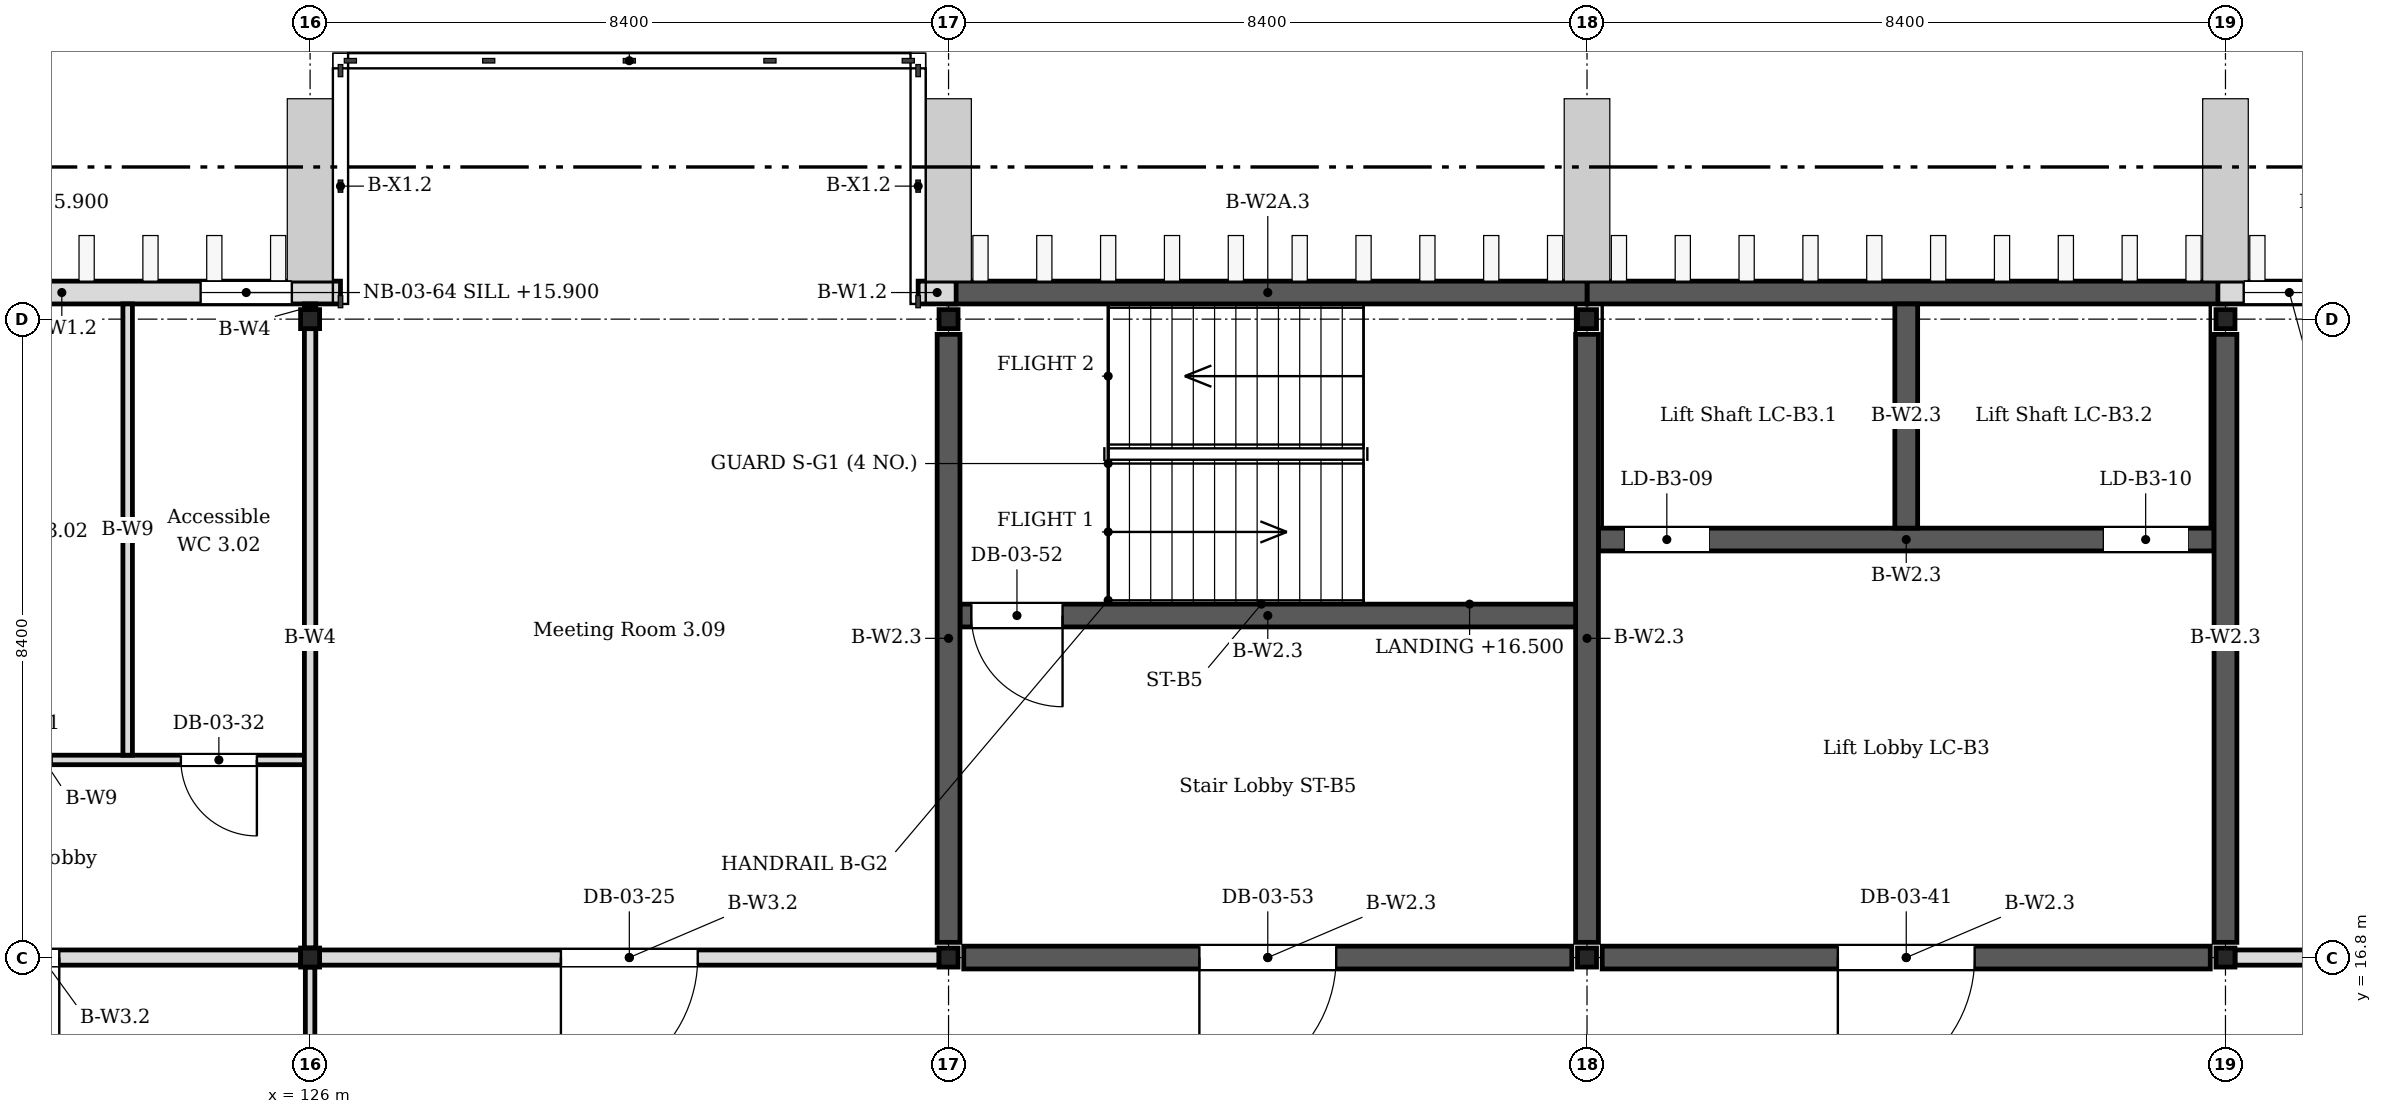
"""IFC4 building model, lengths in metres.
Left out: names, types, materials, properties, quantities, classifications, styles, units other than length and angle.
Written with IfcOpenShell. Run it as: python <this file> out.ifc"""

import sys

from ifc_helpers import new_model, si_unit, direction, frame, frame_2d, origin, origin_2d, place, context, subcontext, project, spatial, rectangle, i_section, extrude, element, fill, save


model = new_model("IFC4")
c1 = context("Model", 3, precision=1e-05, world=origin(), true_north=direction((0.0, 1.0)))
c2 = subcontext(c1, "Body", "Model", "MODEL_VIEW")
j1 = project(units=[si_unit("LENGTHUNIT", "METRE"), si_unit("PLANEANGLEUNIT", "RADIAN")], contexts=[c1])
p1 = place(None, origin())
s1 = spatial("IfcSite", under=j1, at=p1, CompositionType="ELEMENT")
p2 = place(p1, origin())
s2 = spatial("IfcBuilding", under=s1, at=p2, CompositionType="ELEMENT")
p3 = place(p2, frame((0.0, 0.0, 14.4)))
s3 = spatial("IfcBuildingStorey", under=s2, at=p3, CompositionType="ELEMENT", Elevation=14.4)
for number, where, z_axis, x_axis in (
    (1, (126.0, 16.8, 0.0), (0.0, 0.0, 1.0), (1.0, 0.0, 0.0)),
    (2, (126.0, 25.2, 0.0), (0.0, 0.0, 1.0), (1.0, 0.0, 0.0)),
    (3, (134.4, 16.8, 0.0), (0.0, 0.0, 1.0), (1.0, 0.0, 0.0)),
    (4, (134.4, 25.2, 0.0), (0.0, 0.0, 1.0), (1.0, 0.0, 0.0)),
    (5, (142.8, 16.8, 0.0), (0.0, 0.0, 1.0), (1.0, 0.0, 0.0)),
    (6, (142.8, 25.2, 0.0), (0.0, 0.0, 1.0), (1.0, 0.0, 0.0)),
    (7, (151.2, 16.8, 0.0), (0.0, 0.0, 1.0), (1.0, 0.0, 0.0)),
    (8, (151.2, 25.2, 0.0), (0.0, 0.0, 1.0), (1.0, 0.0, 0.0)),
):
    element("IfcColumn", number, at=place(p3, frame(where, z_axis=z_axis, x_axis=x_axis)), inside=s3, PredefinedType="COLUMN", context=c2, shape_type="SweptSolid", body=[
        extrude(i_section(OverallWidth=0.25, OverallDepth=0.25, WebThickness=0.009, FlangeThickness=0.014, FilletRadius=0.013, at=origin_2d()), origin(), (0.0, 0.0, 1.0), 3.95),
    ])
for number, where, z_axis, x_axis in (
    (9, (142.8, 17.0, 0.0), (0.0, 0.0, 1.0), (0.0, 1.0, 0.0)),
    (10, (151.2, 17.0, 0.0), (0.0, 0.0, 1.0), (0.0, 1.0, 0.0)),
):
    element("IfcWall", number, at=place(p3, frame(where, z_axis=z_axis, x_axis=x_axis)), inside=s3, PredefinedType="SHEAR", context=c2, shape_type="SweptSolid", body=[
        extrude(rectangle(XDim=8.0, YDim=0.3, at=frame_2d((4.0, 0.0))), origin(), (0.0, 0.0, 1.0), 3.95),
    ])
p4 = place(p3, frame((143.0, 16.8, 0.0), z_axis=(0.0, 0.0, 1.0), x_axis=(1.0, 0.0, 0.0)))
e11 = element("IfcWall", 11, at=p4, inside=s3, PredefinedType="SHEAR", context=c2, shape_type="SweptSolid", body=[
    extrude(rectangle(XDim=8.0, YDim=0.3, at=frame_2d((4.0, 0.0))), origin(), (0.0, 0.0, 1.0), 3.95),
])
p5 = place(p4, frame((3.1, 0.0, 0.0)))
e12 = element("IfcOpeningElement", 12, at=p5, cuts=e11, PredefinedType="OPENING", context=c2, shape_type="SweptSolid", body=[
    extrude(rectangle(XDim=1.8, YDim=2.1, at=frame_2d((0.9, 1.05))), frame((0.0, 0.16, 0.0), z_axis=(0.0, -1.0, 0.0), x_axis=(1.0, 0.0, 0.0)), (0.0, 0.0, 1.0), 0.32),
])
p6 = place(p3, frame((142.95, 22.3, 0.0), z_axis=(0.0, 0.0, 1.0), x_axis=(1.0, 0.0, 0.0)))
e13 = element("IfcWall", 13, at=p6, inside=s3, PredefinedType="SHEAR", context=c2, shape_type="SweptSolid", body=[
    extrude(rectangle(XDim=8.1, YDim=0.3, at=frame_2d((4.05, 0.0))), origin(), (0.0, 0.0, 1.0), 3.95),
])
p7 = place(p6, frame((0.35, 0.0, 0.0)))
e14 = element("IfcOpeningElement", 14, at=p7, cuts=e13, PredefinedType="OPENING", context=c2, shape_type="SweptSolid", body=[
    extrude(rectangle(XDim=1.1, YDim=2.2, at=frame_2d((0.55, 1.1))), frame((0.0, 0.16, 0.0), z_axis=(0.0, -1.0, 0.0), x_axis=(1.0, 0.0, 0.0)), (0.0, 0.0, 1.0), 0.32),
])
p8 = place(p6, frame((6.65, 0.0, 0.0)))
e15 = element("IfcOpeningElement", 15, at=p8, cuts=e13, PredefinedType="OPENING", context=c2, shape_type="SweptSolid", body=[
    extrude(rectangle(XDim=1.1, YDim=2.2, at=frame_2d((0.55, 1.1))), frame((0.0, 0.16, 0.0), z_axis=(0.0, -1.0, 0.0), x_axis=(1.0, 0.0, 0.0)), (0.0, 0.0, 1.0), 0.32),
])
p9 = place(p3, frame((142.8, 25.55, 0.0), z_axis=(0.0, 0.0, 1.0), x_axis=(1.0, 0.0, 0.0)))
e16 = element("IfcWall", 16, at=p9, inside=s3, PredefinedType="SHEAR", context=c2, shape_type="SweptSolid", body=[
    extrude(rectangle(XDim=8.4, YDim=0.3, at=frame_2d((4.2, 0.0))), origin(), (0.0, 0.0, 1.0), 3.95),
])
p10 = place(p3, frame((147.0, 22.45, 0.0), z_axis=(0.0, 0.0, 1.0), x_axis=(0.0, 1.0, 0.0)))
e17 = element("IfcWall", 17, at=p10, inside=s3, PredefinedType="SHEAR", context=c2, shape_type="SweptSolid", body=[
    extrude(rectangle(XDim=2.95, YDim=0.3, at=frame_2d((1.475, 0.0))), origin(), (0.0, 0.0, 1.0), 3.95),
])
p11 = place(p3, frame((134.4, 17.0, 0.0), z_axis=(0.0, 0.0, 1.0), x_axis=(0.0, 1.0, 0.0)))
e18 = element("IfcWall", 18, at=p11, inside=s3, PredefinedType="SHEAR", context=c2, shape_type="SweptSolid", body=[
    extrude(rectangle(XDim=8.0, YDim=0.3, at=frame_2d((4.0, 0.0))), origin(), (0.0, 0.0, 1.0), 3.95),
])
p12 = place(p3, frame((134.6, 16.8, 0.0), z_axis=(0.0, 0.0, 1.0), x_axis=(1.0, 0.0, 0.0)))
e19 = element("IfcWall", 19, at=p12, inside=s3, PredefinedType="SHEAR", context=c2, shape_type="SweptSolid", body=[
    extrude(rectangle(XDim=8.0, YDim=0.3, at=frame_2d((4.0, 0.0))), origin(), (0.0, 0.0, 1.0), 3.95),
])
p13 = place(p12, frame((3.1, 0.0, 0.0)))
e20 = element("IfcOpeningElement", 20, at=p13, cuts=e19, PredefinedType="OPENING", context=c2, shape_type="SweptSolid", body=[
    extrude(rectangle(XDim=1.8, YDim=2.1, at=frame_2d((0.9, 1.05))), frame((0.0, 0.16, 0.0), z_axis=(0.0, -1.0, 0.0), x_axis=(1.0, 0.0, 0.0)), (0.0, 0.0, 1.0), 0.32),
])
p14 = place(p3, frame((134.55, 21.3, 0.0), z_axis=(0.0, 0.0, 1.0), x_axis=(1.0, 0.0, 0.0)))
e21 = element("IfcWall", 21, at=p14, inside=s3, PredefinedType="SHEAR", context=c2, shape_type="SweptSolid", body=[
    extrude(rectangle(XDim=8.1, YDim=0.3, at=frame_2d((4.05, 0.0))), origin(), (0.0, 0.0, 1.0), 3.95),
])
p15 = place(p14, frame((0.15, 0.0, 0.0)))
e22 = element("IfcOpeningElement", 22, at=p15, cuts=e21, PredefinedType="OPENING", context=c2, shape_type="SweptSolid", body=[
    extrude(rectangle(XDim=1.2, YDim=2.1, at=frame_2d((0.6, 1.05))), frame((0.0, 0.16, 0.0), z_axis=(0.0, -1.0, 0.0), x_axis=(1.0, 0.0, 0.0)), (0.0, 0.0, 1.0), 0.32),
])
p16 = place(p3, frame((134.4, 25.55, 0.0), z_axis=(0.0, 0.0, 1.0), x_axis=(1.0, 0.0, 0.0)))
e23 = element("IfcWall", 23, at=p16, inside=s3, PredefinedType="SHEAR", context=c2, shape_type="SweptSolid", body=[
    extrude(rectangle(XDim=8.4, YDim=0.3, at=frame_2d((4.2, 0.0))), origin(), (0.0, 0.0, 1.0), 3.95),
])
p17 = place(p3, frame((117.5, 25.55, 0.0), z_axis=(0.0, 0.0, 1.0), x_axis=(1.0, 0.0, 0.0)))
e24 = element("IfcWall", 24, at=p17, inside=s3, PredefinedType="SOLIDWALL", context=c2, shape_type="SweptSolid", body=[
    extrude(rectangle(XDim=8.9, YDim=0.3, at=frame_2d((4.45, 0.0))), origin(), (0.0, 0.0, 1.0), 3.95),
])
p18 = place(p17, frame((0.34, 0.0, 1.5)))
e25 = element("IfcOpeningElement", 25, at=p18, cuts=e24, PredefinedType="OPENING", context=c2, shape_type="SweptSolid", body=[
    extrude(rectangle(XDim=1.2, YDim=1.2, at=frame_2d((0.6, 0.6))), frame((0.0, 0.16, 0.0), z_axis=(0.0, -1.0, 0.0), x_axis=(1.0, 0.0, 0.0)), (0.0, 0.0, 1.0), 0.32),
])
p19 = place(p17, frame((3.7, 0.0, 1.5)))
e26 = element("IfcOpeningElement", 26, at=p19, cuts=e24, PredefinedType="OPENING", context=c2, shape_type="SweptSolid", body=[
    extrude(rectangle(XDim=1.2, YDim=1.2, at=frame_2d((0.6, 0.6))), frame((0.0, 0.16, 0.0), z_axis=(0.0, -1.0, 0.0), x_axis=(1.0, 0.0, 0.0)), (0.0, 0.0, 1.0), 0.32),
])
p20 = place(p17, frame((7.06, 0.0, 1.5)))
e27 = element("IfcOpeningElement", 27, at=p20, cuts=e24, PredefinedType="OPENING", context=c2, shape_type="SweptSolid", body=[
    extrude(rectangle(XDim=1.2, YDim=1.2, at=frame_2d((0.6, 0.6))), frame((0.0, 0.16, 0.0), z_axis=(0.0, -1.0, 0.0), x_axis=(1.0, 0.0, 0.0)), (0.0, 0.0, 1.0), 0.32),
])
p21 = place(p3, frame((134.0, 25.55, 0.0), z_axis=(0.0, 0.0, 1.0), x_axis=(1.0, 0.0, 0.0)))
e28 = element("IfcWall", 28, at=p21, inside=s3, PredefinedType="SOLIDWALL", context=c2, shape_type="SweptSolid", body=[
    extrude(rectangle(XDim=0.5, YDim=0.3, at=frame_2d((0.25, 0.0))), origin(), (0.0, 0.0, 1.0), 3.95),
])
p22 = place(p3, frame((151.1, 25.55, 0.0), z_axis=(0.0, 0.0, 1.0), x_axis=(1.0, 0.0, 0.0)))
e29 = element("IfcWall", 29, at=p22, inside=s3, PredefinedType="SOLIDWALL", context=c2, shape_type="SweptSolid", body=[
    extrude(rectangle(XDim=5.9, YDim=0.3, at=frame_2d((2.95, 0.0))), origin(), (0.0, 0.0, 1.0), 3.95),
])
p23 = place(p22, frame((0.34, 0.0, 1.5)))
e30 = element("IfcOpeningElement", 30, at=p23, cuts=e29, PredefinedType="OPENING", context=c2, shape_type="SweptSolid", body=[
    extrude(rectangle(XDim=1.2, YDim=1.2, at=frame_2d((0.6, 0.6))), frame((0.0, 0.16, 0.0), z_axis=(0.0, -1.0, 0.0), x_axis=(1.0, 0.0, 0.0)), (0.0, 0.0, 1.0), 0.32),
])
p24 = place(p22, frame((2.02, 0.0, 1.5)))
e31 = element("IfcOpeningElement", 31, at=p24, cuts=e29, PredefinedType="OPENING", context=c2, shape_type="SweptSolid", body=[
    extrude(rectangle(XDim=1.2, YDim=1.2, at=frame_2d((0.6, 0.6))), frame((0.0, 0.16, 0.0), z_axis=(0.0, -1.0, 0.0), x_axis=(1.0, 0.0, 0.0)), (0.0, 0.0, 1.0), 0.32),
])
p25 = place(p22, frame((3.7, 0.0, 1.5)))
e32 = element("IfcOpeningElement", 32, at=p25, cuts=e29, PredefinedType="OPENING", context=c2, shape_type="SweptSolid", body=[
    extrude(rectangle(XDim=1.2, YDim=1.2, at=frame_2d((0.6, 0.6))), frame((0.0, 0.16, 0.0), z_axis=(0.0, -1.0, 0.0), x_axis=(1.0, 0.0, 0.0)), (0.0, 0.0, 1.0), 0.32),
])
p26 = place(p3, frame((117.725, 16.8, 0.0), z_axis=(0.0, 0.0, 1.0), x_axis=(1.0, 0.0, 0.0)))
e33 = element("IfcWall", 33, at=p26, inside=s3, PredefinedType="PARTITIONING", context=c2, shape_type="SweptSolid", body=[
    extrude(rectangle(XDim=8.15, YDim=0.2, at=frame_2d((4.075, 0.0))), origin(), (0.0, 0.0, 1.0), 3.25),
])
p27 = place(p26, frame((3.175, 0.0, 0.0)))
e34 = element("IfcOpeningElement", 34, at=p27, cuts=e33, PredefinedType="OPENING", context=c2, shape_type="SweptSolid", body=[
    extrude(rectangle(XDim=1.8, YDim=2.1, at=frame_2d((0.9, 1.05))), frame((0.0, 0.11, 0.0), z_axis=(0.0, -1.0, 0.0), x_axis=(1.0, 0.0, 0.0)), (0.0, 0.0, 1.0), 0.22),
])
p28 = place(p3, frame((126.125, 16.8, 0.0), z_axis=(0.0, 0.0, 1.0), x_axis=(1.0, 0.0, 0.0)))
e35 = element("IfcWall", 35, at=p28, inside=s3, PredefinedType="PARTITIONING", context=c2, shape_type="SweptSolid", body=[
    extrude(rectangle(XDim=8.15, YDim=0.2, at=frame_2d((4.075, 0.0))), origin(), (0.0, 0.0, 1.0), 3.25),
])
p29 = place(p28, frame((3.175, 0.0, 0.0)))
e36 = element("IfcOpeningElement", 36, at=p29, cuts=e35, PredefinedType="OPENING", context=c2, shape_type="SweptSolid", body=[
    extrude(rectangle(XDim=1.8, YDim=2.1, at=frame_2d((0.9, 1.05))), frame((0.0, 0.11, 0.0), z_axis=(0.0, -1.0, 0.0), x_axis=(1.0, 0.0, 0.0)), (0.0, 0.0, 1.0), 0.22),
])
p30 = place(p3, frame((151.325, 16.8, 0.0), z_axis=(0.0, 0.0, 1.0), x_axis=(1.0, 0.0, 0.0)))
e37 = element("IfcWall", 37, at=p30, inside=s3, PredefinedType="PARTITIONING", context=c2, shape_type="SweptSolid", body=[
    extrude(rectangle(XDim=5.875, YDim=0.2, at=frame_2d((2.938, 0.0))), origin(), (0.0, 0.0, 1.0), 3.25),
])
p31 = place(p30, frame((3.575, 0.0, 0.0)))
e38 = element("IfcOpeningElement", 38, at=p31, cuts=e37, PredefinedType="OPENING", context=c2, shape_type="SweptSolid", body=[
    extrude(rectangle(XDim=1.0, YDim=2.1, at=frame_2d((0.5, 1.05))), frame((0.0, 0.11, 0.0), z_axis=(0.0, -1.0, 0.0), x_axis=(1.0, 0.0, 0.0)), (0.0, 0.0, 1.0), 0.22),
])
p32 = place(p3, frame((117.75, 19.4, 0.0), z_axis=(0.0, 0.0, 1.0), x_axis=(1.0, 0.0, 0.0)))
e39 = element("IfcWall", 39, at=p32, inside=s3, PredefinedType="PARTITIONING", context=c2, shape_type="SweptSolid", body=[
    extrude(rectangle(XDim=8.175, YDim=0.125, at=frame_2d((4.087, 0.0))), origin(), (0.0, 0.0, 1.0), 3.25),
])
p33 = place(p32, frame((0.85, 0.0, 0.0)))
e40 = element("IfcOpeningElement", 40, at=p33, cuts=e39, PredefinedType="OPENING", context=c2, shape_type="SweptSolid", body=[
    extrude(rectangle(XDim=1.0, YDim=2.1, at=frame_2d((0.5, 1.05))), frame((0.0, 0.073, 0.0), z_axis=(0.0, -1.0, 0.0), x_axis=(1.0, 0.0, 0.0)), (0.0, 0.0, 1.0), 0.145),
])
p34 = place(p32, frame((3.85, 0.0, 0.0)))
e41 = element("IfcOpeningElement", 41, at=p34, cuts=e39, PredefinedType="OPENING", context=c2, shape_type="SweptSolid", body=[
    extrude(rectangle(XDim=1.0, YDim=2.1, at=frame_2d((0.5, 1.05))), frame((0.0, 0.073, 0.0), z_axis=(0.0, -1.0, 0.0), x_axis=(1.0, 0.0, 0.0)), (0.0, 0.0, 1.0), 0.145),
])
p35 = place(p32, frame((6.55, 0.0, 0.0)))
e42 = element("IfcOpeningElement", 42, at=p35, cuts=e39, PredefinedType="OPENING", context=c2, shape_type="SweptSolid", body=[
    extrude(rectangle(XDim=1.0, YDim=2.1, at=frame_2d((0.5, 1.05))), frame((0.0, 0.073, 0.0), z_axis=(0.0, -1.0, 0.0), x_axis=(1.0, 0.0, 0.0)), (0.0, 0.0, 1.0), 0.145),
])
p36 = place(p3, frame((123.6, 19.462, 0.0), z_axis=(0.0, 0.0, 1.0), x_axis=(0.0, 1.0, 0.0)))
e43 = element("IfcWall", 43, at=p36, inside=s3, PredefinedType="PARTITIONING", context=c2, shape_type="SweptSolid", body=[
    extrude(rectangle(XDim=5.938, YDim=0.125, at=frame_2d((2.969, 0.0))), origin(), (0.0, 0.0, 1.0), 3.25),
])
p37 = place(p3, frame((126.0, 8.525, 0.0), z_axis=(0.0, 0.0, 1.0), x_axis=(0.0, 1.0, 0.0)))
e44 = element("IfcWall", 44, at=p37, inside=s3, PredefinedType="PARTITIONING", context=c2, shape_type="SweptSolid", body=[
    extrude(rectangle(XDim=8.15, YDim=0.125, at=frame_2d((4.075, 0.0))), origin(), (0.0, 0.0, 1.0), 3.25),
])
p38 = place(p37, frame((2.875, 0.0, 0.0)))
e45 = element("IfcOpeningElement", 45, at=p38, cuts=e44, PredefinedType="OPENING", context=c2, shape_type="SweptSolid", body=[
    extrude(rectangle(XDim=2.4, YDim=2.2, at=frame_2d((1.2, 1.1))), frame((0.0, 0.073, 0.0), z_axis=(0.0, -1.0, 0.0), x_axis=(1.0, 0.0, 0.0)), (0.0, 0.0, 1.0), 0.145),
])
p39 = place(p3, frame((126.0, 16.925, 0.0), z_axis=(0.0, 0.0, 1.0), x_axis=(0.0, 1.0, 0.0)))
e46 = element("IfcWall", 46, at=p39, inside=s3, PredefinedType="PARTITIONING", context=c2, shape_type="SweptSolid", body=[
    extrude(rectangle(XDim=8.15, YDim=0.15, at=frame_2d((4.075, 0.0))), origin(), (0.0, 0.0, 1.0), 3.25),
])
p40 = place(p3, frame((126.0, 25.325, 0.0), z_axis=(0.0, 0.0, 1.0), x_axis=(0.0, 1.0, 0.0)))
e47 = element("IfcWall", 47, at=p40, inside=s3, PredefinedType="PARTITIONING", context=c2, shape_type="SweptSolid", body=[
    extrude(rectangle(XDim=0.075, YDim=0.15, at=frame_2d((0.038, 0.0))), origin(), (0.0, 0.0, 1.0), 3.25),
])
p41 = place(p20, origin())
e48 = element("IfcWindow", 48, at=p41, inside=s3, PartitioningType="SINGLE_PANEL", PredefinedType="WINDOW", context=c2, shape_type="SweptSolid", body=[
    extrude(rectangle(XDim=1.2, YDim=1.2, at=frame_2d((0.6, 0.6))), frame((0.0, 0.03, 0.0), z_axis=(0.0, -1.0, 0.0), x_axis=(1.0, 0.0, 0.0)), (0.0, 0.0, 1.0), 0.06),
])
fill(e27, e48)
p42 = place(p23, origin())
e49 = element("IfcWindow", 49, at=p42, inside=s3, PartitioningType="SINGLE_PANEL", PredefinedType="WINDOW", context=c2, shape_type="SweptSolid", body=[
    extrude(rectangle(XDim=1.2, YDim=1.2, at=frame_2d((0.6, 0.6))), frame((0.0, 0.03, 0.0), z_axis=(0.0, -1.0, 0.0), x_axis=(1.0, 0.0, 0.0)), (0.0, 0.0, 1.0), 0.06),
])
fill(e30, e49)
p43 = place(p27, origin())
e50 = element("IfcDoor", 50, at=p43, inside=s3, OperationType="DOUBLE_DOOR_SINGLE_SWING", PredefinedType="DOOR", context=c2, shape_type="SweptSolid", body=[
    extrude(rectangle(XDim=1.8, YDim=2.1, at=frame_2d((0.9, 1.05))), frame((0.0, 0.025, 0.0), z_axis=(0.0, -1.0, 0.0), x_axis=(1.0, 0.0, 0.0)), (0.0, 0.0, 1.0), 0.05),
])
fill(e34, e50)
p44 = place(p29, origin())
e51 = element("IfcDoor", 51, at=p44, inside=s3, OperationType="DOUBLE_DOOR_SINGLE_SWING", PredefinedType="DOOR", context=c2, shape_type="SweptSolid", body=[
    extrude(rectangle(XDim=1.8, YDim=2.1, at=frame_2d((0.9, 1.05))), frame((0.0, 0.025, 0.0), z_axis=(0.0, -1.0, 0.0), x_axis=(1.0, 0.0, 0.0)), (0.0, 0.0, 1.0), 0.05),
])
fill(e36, e51)
p45 = place(p35, origin())
e52 = element("IfcDoor", 52, at=p45, inside=s3, OperationType="SINGLE_SWING_LEFT", PredefinedType="DOOR", context=c2, shape_type="SweptSolid", body=[
    extrude(rectangle(XDim=1.0, YDim=2.1, at=frame_2d((0.5, 1.05))), frame((0.0, 0.025, 0.0), z_axis=(0.0, -1.0, 0.0), x_axis=(1.0, 0.0, 0.0)), (0.0, 0.0, 1.0), 0.05),
])
fill(e42, e52)
p46 = place(p5, origin())
e53 = element("IfcDoor", 53, at=p46, inside=s3, OperationType="DOUBLE_DOOR_SINGLE_SWING", PredefinedType="DOOR", context=c2, shape_type="SweptSolid", body=[
    extrude(rectangle(XDim=1.8, YDim=2.1, at=frame_2d((0.9, 1.05))), frame((0.0, 0.025, 0.0), z_axis=(0.0, -1.0, 0.0), x_axis=(1.0, 0.0, 0.0)), (0.0, 0.0, 1.0), 0.05),
])
fill(e12, e53)
p47 = place(p7, origin())
e54 = element("IfcDoor", 54, at=p47, inside=s3, OperationType="SLIDING_TO_LEFT", PredefinedType="DOOR", context=c2, shape_type="SweptSolid", body=[
    extrude(rectangle(XDim=1.1, YDim=2.2, at=frame_2d((0.55, 1.1))), frame((0.0, 0.025, 0.0), z_axis=(0.0, -1.0, 0.0), x_axis=(1.0, 0.0, 0.0)), (0.0, 0.0, 1.0), 0.05),
])
fill(e14, e54)
p48 = place(p8, origin())
e55 = element("IfcDoor", 55, at=p48, inside=s3, OperationType="SLIDING_TO_LEFT", PredefinedType="DOOR", context=c2, shape_type="SweptSolid", body=[
    extrude(rectangle(XDim=1.1, YDim=2.2, at=frame_2d((0.55, 1.1))), frame((0.0, 0.025, 0.0), z_axis=(0.0, -1.0, 0.0), x_axis=(1.0, 0.0, 0.0)), (0.0, 0.0, 1.0), 0.05),
])
fill(e15, e55)
p49 = place(p15, origin())
e56 = element("IfcDoor", 56, at=p49, inside=s3, OperationType="SINGLE_SWING_LEFT", PredefinedType="DOOR", context=c2, shape_type="SweptSolid", body=[
    extrude(rectangle(XDim=1.2, YDim=2.1, at=frame_2d((0.6, 1.05))), frame((0.0, 0.025, 0.0), z_axis=(0.0, -1.0, 0.0), x_axis=(1.0, 0.0, 0.0)), (0.0, 0.0, 1.0), 0.05),
])
fill(e22, e56)
p50 = place(p13, origin())
e57 = element("IfcDoor", 57, at=p50, inside=s3, OperationType="DOUBLE_DOOR_SINGLE_SWING", PredefinedType="DOOR", context=c2, shape_type="SweptSolid", body=[
    extrude(rectangle(XDim=1.8, YDim=2.1, at=frame_2d((0.9, 1.05))), frame((0.0, 0.025, 0.0), z_axis=(0.0, -1.0, 0.0), x_axis=(1.0, 0.0, 0.0)), (0.0, 0.0, 1.0), 0.05),
])
fill(e20, e57)
save(model, sys.argv[1])
